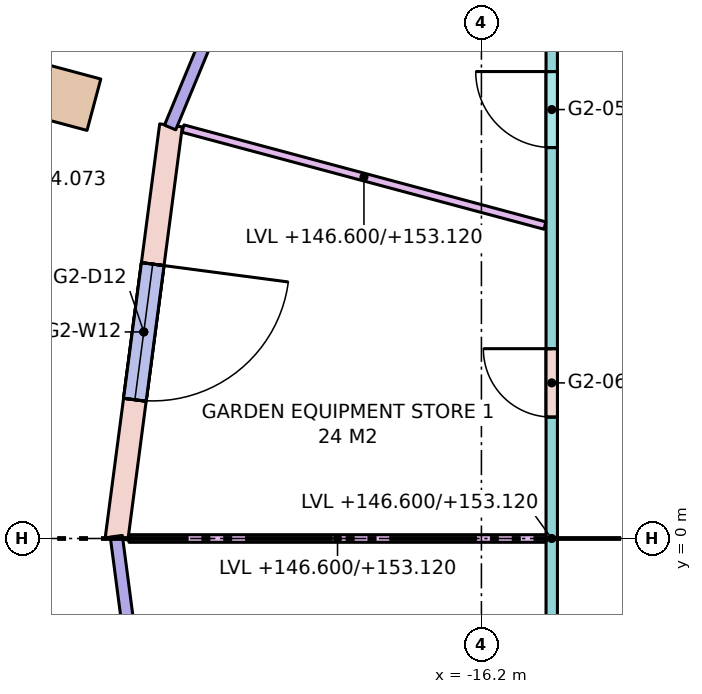
"""IFC4 building model, lengths in metres.
Left out: names, types, materials, properties, quantities, classifications, styles, units other than length and angle.
Written with IfcOpenShell. Run it as: python <this file> out.ifc"""

import sys

from ifc_helpers import new_model, si_unit, direction, frame, frame_2d, origin, origin_2d, place, context, subcontext, project, spatial, rectangle, extrude, element, fill, save


model = new_model("IFC4")
c1 = context("Model", 3, precision=1e-05, world=origin(), true_north=direction((0.0, 1.0)))
c2 = subcontext(c1, "Body", "Model", "MODEL_VIEW")
j1 = project(units=[si_unit("LENGTHUNIT", "METRE"), si_unit("PLANEANGLEUNIT", "RADIAN")], contexts=[c1])
p1 = place(None, origin())
s1 = spatial("IfcSite", under=j1, at=p1, CompositionType="ELEMENT")
p2 = place(p1, origin())
s2 = spatial("IfcBuilding", under=s1, at=p2, CompositionType="ELEMENT")
p3 = place(p2, frame((0.0, 0.0, 146.6)))
s3 = spatial("IfcBuildingStorey", under=s2, at=p3, CompositionType="ELEMENT", Elevation=146.6)
p4 = place(p3, frame((-23.633, 6.333, 0.127), z_axis=(0.245825937887, -0.065892151238, 0.967071782583), x_axis=(0.258904424314, 0.965902944954, 0.0)))
e1 = element("IfcColumn", 1, at=p4, inside=s3, PredefinedType="COLUMN", context=c2, shape_type="SweptSolid", body=[
    extrude(rectangle(XDim=0.7, YDim=1.0, at=origin_2d()), origin(), (0.0, 0.0, 1.0), 7.595),
])
p5 = place(p3, frame((-20.284, 5.435, 0.0), z_axis=(0.0, 0.0, 1.0), x_axis=(-0.130527087244, -0.991444743541, 0.0)))
e2 = element("IfcWall", 2, at=p5, inside=s3, PredefinedType="STANDARD", context=c2, shape_type="SweptSolid", body=[
    extrude(rectangle(XDim=5.482, YDim=0.3, at=frame_2d((2.741, 0.0))), origin(), (0.0, 0.0, 1.0), 7.32),
])
p6 = place(p5, frame((1.841, 0.0, 0.0)))
e3 = element("IfcOpeningElement", 3, at=p6, cuts=e2, PredefinedType="OPENING", context=c2, shape_type="SweptSolid", body=[
    extrude(rectangle(XDim=1.8, YDim=2.4, at=frame_2d((0.9, 1.2))), frame((0.0, 0.16, 0.0), z_axis=(0.0, -1.0, 0.0), x_axis=(1.0, 0.0, 0.0)), (0.0, 0.0, 1.0), 0.32),
])
p7 = place(p5, frame((1.841, 0.0, 2.8)))
e4 = element("IfcOpeningElement", 4, at=p7, cuts=e2, PredefinedType="OPENING", context=c2, shape_type="SweptSolid", body=[
    extrude(rectangle(XDim=1.8, YDim=4.3, at=frame_2d((0.9, 2.15))), frame((0.0, 0.16, 0.0), z_axis=(0.0, -1.0, 0.0), x_axis=(1.0, 0.0, 0.0)), (0.0, 0.0, 1.0), 0.32),
])
p8 = place(p3, frame((-15.275, -7.244, 0.0), z_axis=(0.0, 0.0, 1.0), x_axis=(0.0, 1.0, 0.0)))
e5 = element("IfcWall", 5, at=p8, inside=s3, PredefinedType="PARTITIONING", context=c2, shape_type="SweptSolid", body=[
    extrude(rectangle(XDim=14.487, YDim=0.15, at=frame_2d((7.244, 0.0))), origin(), (0.0, 0.0, 1.0), 6.52),
])
p9 = place(p8, frame((12.387, 0.0, 0.0)))
e6 = element("IfcOpeningElement", 6, at=p9, cuts=e5, PredefinedType="OPENING", context=c2, shape_type="SweptSolid", body=[
    extrude(rectangle(XDim=1.0, YDim=2.1, at=frame_2d((0.5, 1.05))), frame((0.0, 0.085, 0.0), z_axis=(0.0, -1.0, 0.0), x_axis=(1.0, 0.0, 0.0)), (0.0, 0.0, 1.0), 0.17),
])
p10 = place(p8, frame((8.841, 0.0, 0.0)))
e7 = element("IfcOpeningElement", 7, at=p10, cuts=e5, PredefinedType="OPENING", context=c2, shape_type="SweptSolid", body=[
    extrude(rectangle(XDim=0.9, YDim=2.1, at=frame_2d((0.45, 1.05))), frame((0.0, 0.085, 0.0), z_axis=(0.0, -1.0, 0.0), x_axis=(1.0, 0.0, 0.0)), (0.0, 0.0, 1.0), 0.17),
])
p11 = place(p3, frame((-15.364, 4.117, 0.0), z_axis=(0.0, 0.0, 1.0), x_axis=(-0.96593677988, 0.258778162283, 0.0)))
e8 = element("IfcWall", 8, at=p11, inside=s3, PredefinedType="PARTITIONING", context=c2, shape_type="SweptSolid", body=[
    extrude(rectangle(XDim=4.93, YDim=0.1, at=frame_2d((2.465, 0.0))), origin(), (0.0, 0.0, 1.0), 6.52),
])
p12 = place(p3, frame((-15.35, 0.0, 0.0), z_axis=(0.0, 0.0, 1.0), x_axis=(-1.0, 0.0, 0.0)))
e9 = element("IfcWall", 9, at=p12, inside=s3, PredefinedType="PARTITIONING", context=c2, shape_type="SweptSolid", body=[
    extrude(rectangle(XDim=5.487, YDim=0.1, at=frame_2d((2.743, 0.0))), origin(), (0.0, 0.0, 1.0), 6.52),
])
p13 = place(p6, origin())
e10 = element("IfcDoor", 10, at=p13, inside=s3, OperationType="SINGLE_SWING_LEFT", PredefinedType="DOOR", context=c2, shape_type="SweptSolid", body=[
    extrude(rectangle(XDim=1.8, YDim=2.4, at=frame_2d((0.9, 1.2))), frame((0.0, 0.025, 0.0), z_axis=(0.0, -1.0, 0.0), x_axis=(1.0, 0.0, 0.0)), (0.0, 0.0, 1.0), 0.05),
])
fill(e3, e10)
p14 = place(p7, origin())
e11 = element("IfcWindow", 11, at=p14, inside=s3, PartitioningType="SINGLE_PANEL", PredefinedType="WINDOW", context=c2, shape_type="SweptSolid", body=[
    extrude(rectangle(XDim=1.8, YDim=4.3, at=frame_2d((0.9, 2.15))), frame((0.0, 0.03, 0.0), z_axis=(0.0, -1.0, 0.0), x_axis=(1.0, 0.0, 0.0)), (0.0, 0.0, 1.0), 0.06),
])
fill(e4, e11)
p15 = place(p9, origin())
e12 = element("IfcDoor", 12, at=p15, inside=s3, OperationType="SINGLE_SWING_RIGHT", PredefinedType="DOOR", context=c2, shape_type="SweptSolid", body=[
    extrude(rectangle(XDim=1.0, YDim=2.1, at=frame_2d((0.5, 1.05))), frame((0.0, 0.025, 0.0), z_axis=(0.0, -1.0, 0.0), x_axis=(1.0, 0.0, 0.0)), (0.0, 0.0, 1.0), 0.05),
])
fill(e6, e12)
p16 = place(p10, origin())
e13 = element("IfcDoor", 13, at=p16, inside=s3, OperationType="SINGLE_SWING_RIGHT", PredefinedType="DOOR", context=c2, shape_type="SweptSolid", body=[
    extrude(rectangle(XDim=0.9, YDim=2.1, at=frame_2d((0.45, 1.05))), frame((0.0, 0.025, 0.0), z_axis=(0.0, -1.0, 0.0), x_axis=(1.0, 0.0, 0.0)), (0.0, 0.0, 1.0), 0.05),
])
fill(e7, e13)
save(model, sys.argv[1])
